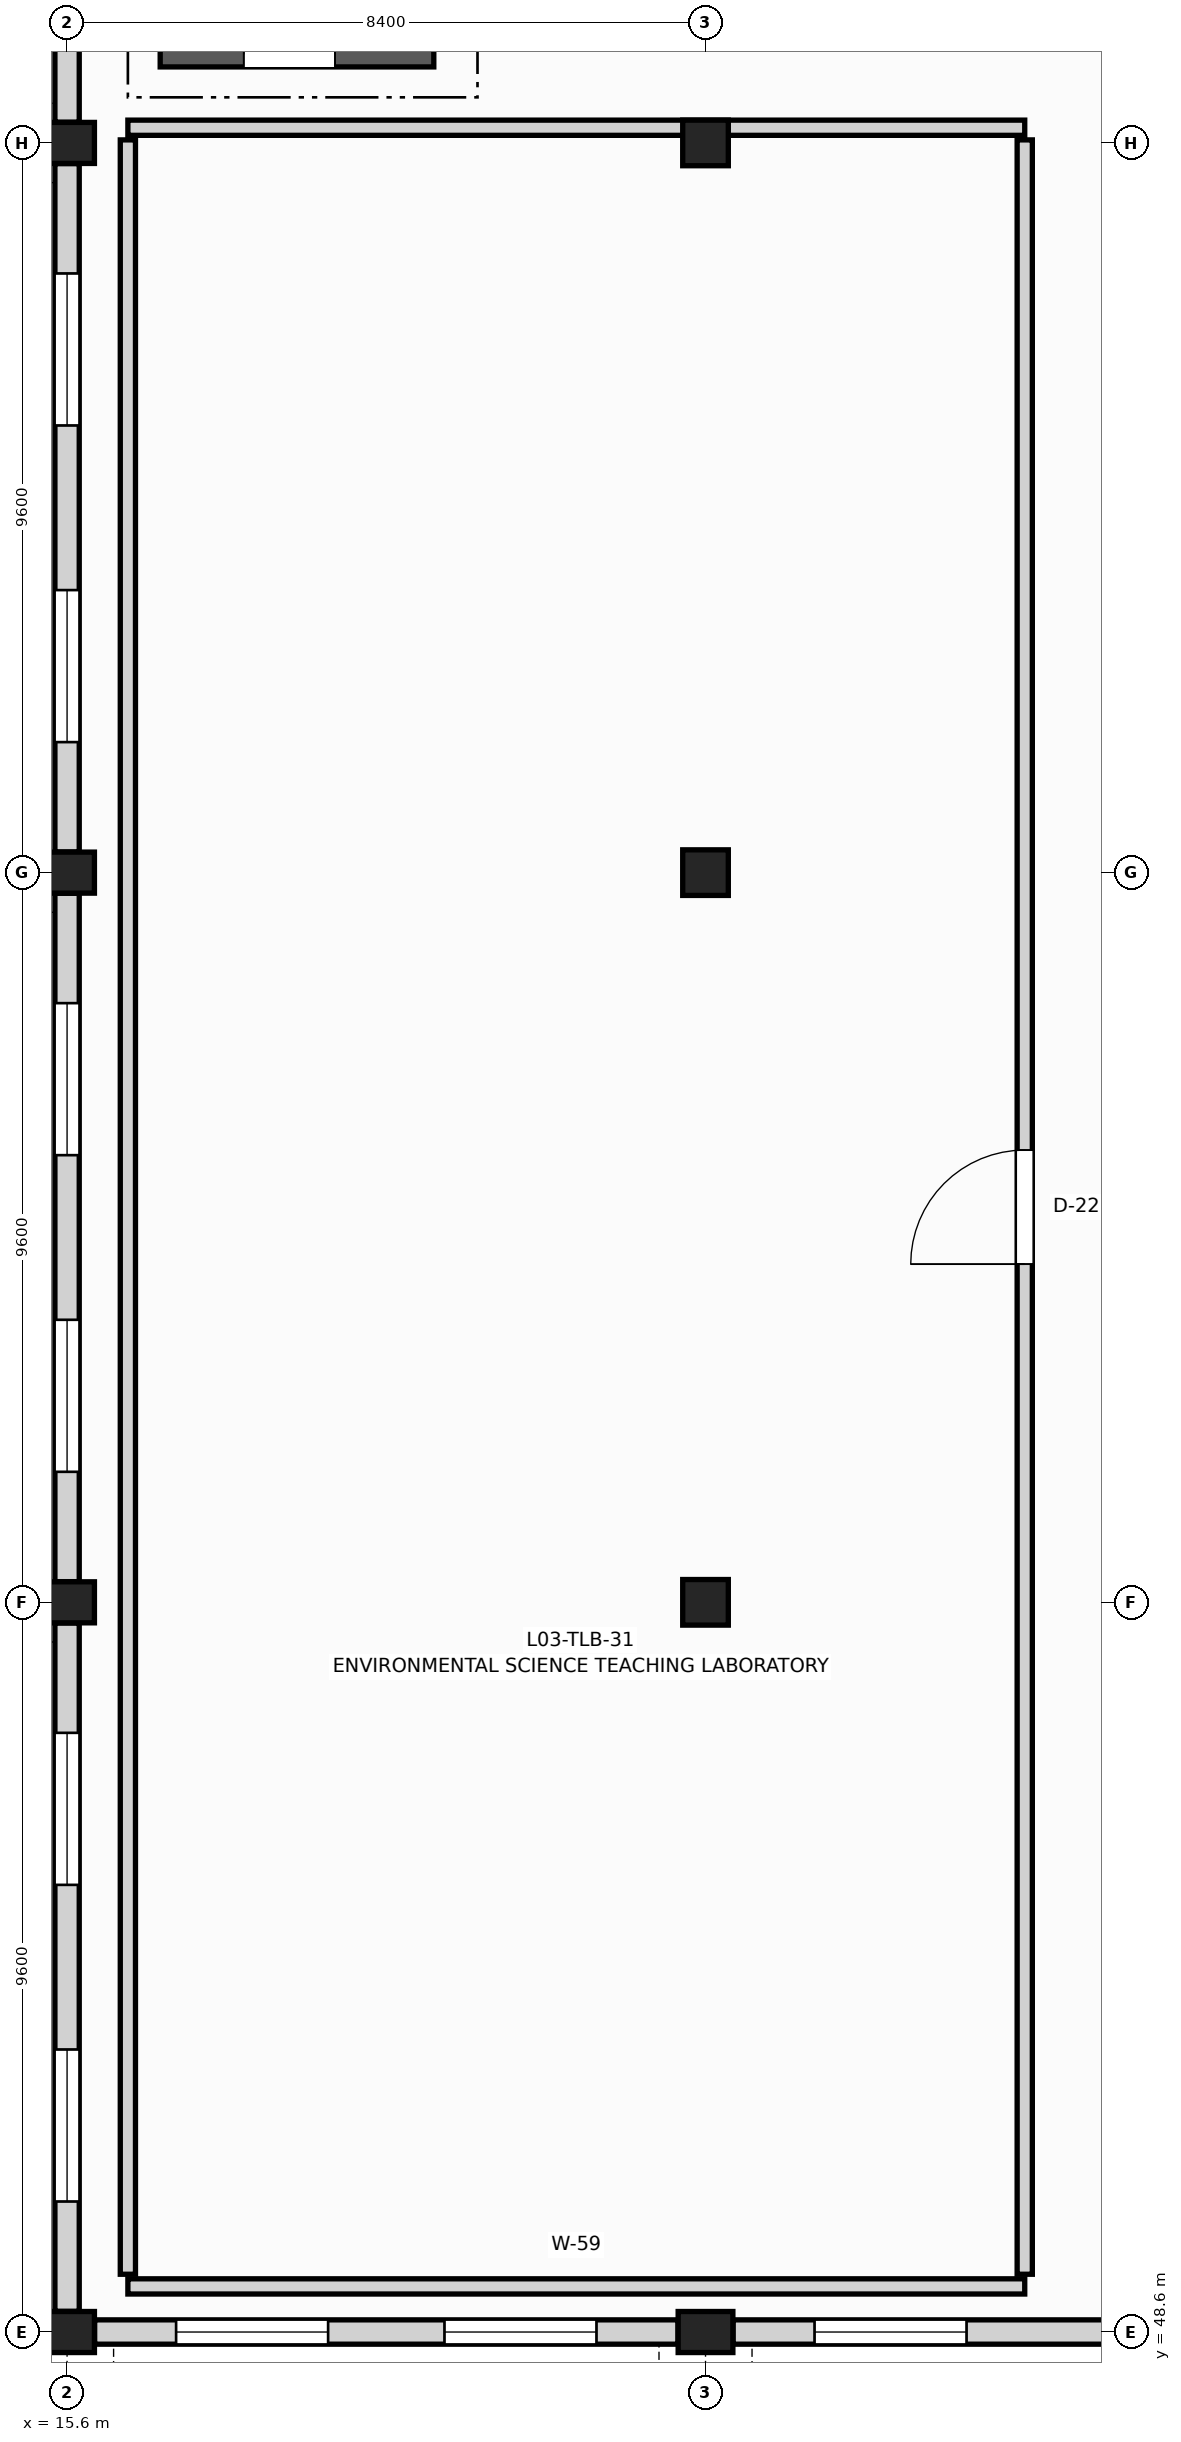
"""IFC4 building model, lengths in metres.
Left out: names, types, materials, properties, quantities, classifications, styles, units other than length and angle.
Written with IfcOpenShell. Run it as: python <this file> out.ifc"""

import sys

from ifc_helpers import new_model, si_unit, direction, frame, frame_2d, origin, origin_2d, place, context, subcontext, project, spatial, rectangle, extrude, element, fill, save


model = new_model("IFC4")
c1 = context("Model", 3, precision=1e-05, world=origin(), true_north=direction((0.0, 1.0)))
c2 = subcontext(c1, "Body", "Model", "MODEL_VIEW")
j1 = project(units=[si_unit("LENGTHUNIT", "METRE"), si_unit("PLANEANGLEUNIT", "RADIAN")], contexts=[c1])
p1 = place(None, origin())
s1 = spatial("IfcSite", under=j1, at=p1, CompositionType="ELEMENT")
p2 = place(p1, origin())
s2 = spatial("IfcBuilding", under=s1, at=p2, CompositionType="ELEMENT")
p3 = place(p2, frame((0.0, 0.0, 14.1)))
s3 = spatial("IfcBuildingStorey", under=s2, at=p3, CompositionType="ELEMENT", Elevation=14.1)
for number, where, z_axis, x_axis in (
    (1, (15.6, 48.6, 0.0), (0.0, 0.0, 1.0), (1.0, 0.0, 0.0)),
    (2, (15.6, 58.2, 0.0), (0.0, 0.0, 1.0), (1.0, 0.0, 0.0)),
    (3, (15.6, 67.8, 0.0), (0.0, 0.0, 1.0), (1.0, 0.0, 0.0)),
    (4, (15.6, 77.4, 0.0), (0.0, 0.0, 1.0), (1.0, 0.0, 0.0)),
    (5, (24.0, 48.6, 0.0), (0.0, 0.0, 1.0), (1.0, 0.0, 0.0)),
):
    element("IfcColumn", number, at=place(p3, frame(where, z_axis=z_axis, x_axis=x_axis)), inside=s3, PredefinedType="COLUMN", context=c2, shape_type="SweptSolid", body=[
        extrude(rectangle(XDim=0.72, YDim=0.54, at=origin_2d()), origin(), (0.0, 0.0, 1.0), 3.9),
    ])
for number, where, z_axis, x_axis in (
    (6, (24.0, 58.2, 0.0), (0.0, 0.0, 1.0), (1.0, 0.0, 0.0)),
    (7, (24.0, 67.8, 0.0), (0.0, 0.0, 1.0), (1.0, 0.0, 0.0)),
    (8, (24.0, 77.4, 0.0), (0.0, 0.0, 1.0), (1.0, 0.0, 0.0)),
):
    element("IfcColumn", number, at=place(p3, frame(where, z_axis=z_axis, x_axis=x_axis)), inside=s3, PredefinedType="COLUMN", context=c2, shape_type="SweptSolid", body=[
        extrude(rectangle(XDim=0.6, YDim=0.6, at=origin_2d()), origin(), (0.0, 0.0, 1.0), 3.9),
    ])
p4 = place(p3, frame((15.962, 48.6, 0.0), z_axis=(0.0, 0.0, 1.0), x_axis=(1.0, 0.0, 0.0)))
e9 = element("IfcWall", 9, at=p4, inside=s3, PredefinedType="SOLIDWALL", context=c2, shape_type="SweptSolid", body=[
    extrude(rectangle(XDim=7.676, YDim=0.32, at=frame_2d((3.838, 0.0))), origin(), (0.0, 0.0, 1.0), 3.08),
])
p5 = place(p4, frame((1.073, 0.0, 0.85)))
e10 = element("IfcOpeningElement", 10, at=p5, cuts=e9, PredefinedType="OPENING", context=c2, shape_type="SweptSolid", body=[
    extrude(rectangle(XDim=2.0, YDim=1.9, at=frame_2d((1.0, 0.95))), frame((0.0, 0.17, 0.0), z_axis=(0.0, -1.0, 0.0), x_axis=(1.0, 0.0, 0.0)), (0.0, 0.0, 1.0), 0.34),
])
p6 = place(p4, frame((4.604, 0.0, 0.85)))
e11 = element("IfcOpeningElement", 11, at=p6, cuts=e9, PredefinedType="OPENING", context=c2, shape_type="SweptSolid", body=[
    extrude(rectangle(XDim=2.0, YDim=1.9, at=frame_2d((1.0, 0.95))), frame((0.0, 0.17, 0.0), z_axis=(0.0, -1.0, 0.0), x_axis=(1.0, 0.0, 0.0)), (0.0, 0.0, 1.0), 0.34),
])
p7 = place(p3, frame((24.362, 48.6, 0.0), z_axis=(0.0, 0.0, 1.0), x_axis=(1.0, 0.0, 0.0)))
e12 = element("IfcWall", 12, at=p7, inside=s3, PredefinedType="SOLIDWALL", context=c2, shape_type="SweptSolid", body=[
    extrude(rectangle(XDim=7.676, YDim=0.32, at=frame_2d((3.838, 0.0))), origin(), (0.0, 0.0, 1.0), 3.08),
])
p8 = place(p7, frame((1.073, 0.0, 0.85)))
e13 = element("IfcOpeningElement", 13, at=p8, cuts=e12, PredefinedType="OPENING", context=c2, shape_type="SweptSolid", body=[
    extrude(rectangle(XDim=2.0, YDim=1.9, at=frame_2d((1.0, 0.95))), frame((0.0, 0.17, 0.0), z_axis=(0.0, -1.0, 0.0), x_axis=(1.0, 0.0, 0.0)), (0.0, 0.0, 1.0), 0.34),
])
p9 = place(p3, frame((15.6, 48.872, 0.0), z_axis=(0.0, 0.0, 1.0), x_axis=(0.0, 1.0, 0.0)))
e14 = element("IfcWall", 14, at=p9, inside=s3, PredefinedType="SOLIDWALL", context=c2, shape_type="SweptSolid", body=[
    extrude(rectangle(XDim=9.056, YDim=0.32, at=frame_2d((4.528, 0.0))), origin(), (0.0, 0.0, 1.0), 3.08),
])
p10 = place(p9, frame((1.445, 0.0, 0.85)))
e15 = element("IfcOpeningElement", 15, at=p10, cuts=e14, PredefinedType="OPENING", context=c2, shape_type="SweptSolid", body=[
    extrude(rectangle(XDim=2.0, YDim=1.9, at=frame_2d((1.0, 0.95))), frame((0.0, 0.17, 0.0), z_axis=(0.0, -1.0, 0.0), x_axis=(1.0, 0.0, 0.0)), (0.0, 0.0, 1.0), 0.34),
])
p11 = place(p9, frame((5.611, 0.0, 0.85)))
e16 = element("IfcOpeningElement", 16, at=p11, cuts=e14, PredefinedType="OPENING", context=c2, shape_type="SweptSolid", body=[
    extrude(rectangle(XDim=2.0, YDim=1.9, at=frame_2d((1.0, 0.95))), frame((0.0, 0.17, 0.0), z_axis=(0.0, -1.0, 0.0), x_axis=(1.0, 0.0, 0.0)), (0.0, 0.0, 1.0), 0.34),
])
p12 = place(p3, frame((15.6, 58.472, 0.0), z_axis=(0.0, 0.0, 1.0), x_axis=(0.0, 1.0, 0.0)))
e17 = element("IfcWall", 17, at=p12, inside=s3, PredefinedType="SOLIDWALL", context=c2, shape_type="SweptSolid", body=[
    extrude(rectangle(XDim=9.056, YDim=0.32, at=frame_2d((4.528, 0.0))), origin(), (0.0, 0.0, 1.0), 3.08),
])
p13 = place(p12, frame((1.445, 0.0, 0.85)))
e18 = element("IfcOpeningElement", 18, at=p13, cuts=e17, PredefinedType="OPENING", context=c2, shape_type="SweptSolid", body=[
    extrude(rectangle(XDim=2.0, YDim=1.9, at=frame_2d((1.0, 0.95))), frame((0.0, 0.17, 0.0), z_axis=(0.0, -1.0, 0.0), x_axis=(1.0, 0.0, 0.0)), (0.0, 0.0, 1.0), 0.34),
])
p14 = place(p12, frame((5.611, 0.0, 0.85)))
e19 = element("IfcOpeningElement", 19, at=p14, cuts=e17, PredefinedType="OPENING", context=c2, shape_type="SweptSolid", body=[
    extrude(rectangle(XDim=2.0, YDim=1.9, at=frame_2d((1.0, 0.95))), frame((0.0, 0.17, 0.0), z_axis=(0.0, -1.0, 0.0), x_axis=(1.0, 0.0, 0.0)), (0.0, 0.0, 1.0), 0.34),
])
p15 = place(p3, frame((15.6, 68.072, 0.0), z_axis=(0.0, 0.0, 1.0), x_axis=(0.0, 1.0, 0.0)))
e20 = element("IfcWall", 20, at=p15, inside=s3, PredefinedType="SOLIDWALL", context=c2, shape_type="SweptSolid", body=[
    extrude(rectangle(XDim=9.056, YDim=0.32, at=frame_2d((4.528, 0.0))), origin(), (0.0, 0.0, 1.0), 3.08),
])
p16 = place(p15, frame((1.445, 0.0, 0.85)))
e21 = element("IfcOpeningElement", 21, at=p16, cuts=e20, PredefinedType="OPENING", context=c2, shape_type="SweptSolid", body=[
    extrude(rectangle(XDim=2.0, YDim=1.9, at=frame_2d((1.0, 0.95))), frame((0.0, 0.17, 0.0), z_axis=(0.0, -1.0, 0.0), x_axis=(1.0, 0.0, 0.0)), (0.0, 0.0, 1.0), 0.34),
])
p17 = place(p15, frame((5.611, 0.0, 0.85)))
e22 = element("IfcOpeningElement", 22, at=p17, cuts=e20, PredefinedType="OPENING", context=c2, shape_type="SweptSolid", body=[
    extrude(rectangle(XDim=2.0, YDim=1.9, at=frame_2d((1.0, 0.95))), frame((0.0, 0.17, 0.0), z_axis=(0.0, -1.0, 0.0), x_axis=(1.0, 0.0, 0.0)), (0.0, 0.0, 1.0), 0.34),
])
p18 = place(p3, frame((15.6, 77.672, 0.0), z_axis=(0.0, 0.0, 1.0), x_axis=(0.0, 1.0, 0.0)))
e23 = element("IfcWall", 23, at=p18, inside=s3, PredefinedType="SOLIDWALL", context=c2, shape_type="SweptSolid", body=[
    extrude(rectangle(XDim=8.976, YDim=0.32, at=frame_2d((4.488, 0.0))), origin(), (0.0, 0.0, 1.0), 3.08),
])
p19 = place(p18, frame((1.424, 0.0, 0.85)))
e24 = element("IfcOpeningElement", 24, at=p19, cuts=e23, PredefinedType="OPENING", context=c2, shape_type="SweptSolid", body=[
    extrude(rectangle(XDim=2.0, YDim=1.9, at=frame_2d((1.0, 0.95))), frame((0.0, 0.17, 0.0), z_axis=(0.0, -1.0, 0.0), x_axis=(1.0, 0.0, 0.0)), (0.0, 0.0, 1.0), 0.34),
])
p20 = place(p18, frame((5.552, 0.0, 0.85)))
e25 = element("IfcOpeningElement", 25, at=p20, cuts=e23, PredefinedType="OPENING", context=c2, shape_type="SweptSolid", body=[
    extrude(rectangle(XDim=2.0, YDim=1.9, at=frame_2d((1.0, 0.95))), frame((0.0, 0.17, 0.0), z_axis=(0.0, -1.0, 0.0), x_axis=(1.0, 0.0, 0.0)), (0.0, 0.0, 1.0), 0.34),
])
p21 = place(p3, frame((16.825, 78.575, 0.0), z_axis=(0.0, 0.0, 1.0), x_axis=(1.0, 0.0, 0.0)))
e26 = element("IfcWall", 26, at=p21, inside=s3, PredefinedType="SHEAR", context=c2, shape_type="SweptSolid", body=[
    extrude(rectangle(XDim=3.6, YDim=0.35, at=frame_2d((1.8, 0.0))), origin(), (0.0, 0.0, 1.0), 3.9),
])
p22 = place(p21, frame((1.1, 0.0, 0.0)))
e27 = element("IfcOpeningElement", 27, at=p22, cuts=e26, PredefinedType="OPENING", context=c2, shape_type="SweptSolid", body=[
    extrude(rectangle(XDim=1.2, YDim=2.2, at=frame_2d((0.6, 1.1))), frame((0.0, 0.185, 0.0), z_axis=(0.0, -1.0, 0.0), x_axis=(1.0, 0.0, 0.0)), (0.0, 0.0, 1.0), 0.37),
])
for number, where, z_axis, x_axis in (
    (28, (16.4, 49.2, 0.0), (0.0, 0.0, 1.0), (1.0, 0.0, 0.0)),
    (29, (16.4, 77.6, 0.0), (0.0, 0.0, 1.0), (1.0, 0.0, 0.0)),
):
    element("IfcWall", number, at=place(p3, frame(where, z_axis=z_axis, x_axis=x_axis)), inside=s3, PredefinedType="PARTITIONING", context=c2, shape_type="SweptSolid", body=[
        extrude(rectangle(XDim=11.8, YDim=0.2, at=frame_2d((5.9, 0.0))), origin(), (0.0, 0.0, 1.0), 3.15),
    ])
p23 = place(p3, frame((16.4, 49.36, 0.0), z_axis=(0.0, 0.0, 1.0), x_axis=(0.0, 1.0, 0.0)))
e30 = element("IfcWall", 30, at=p23, inside=s3, PredefinedType="PARTITIONING", context=c2, shape_type="SweptSolid", body=[
    extrude(rectangle(XDim=28.08, YDim=0.2, at=frame_2d((14.04, 0.0))), origin(), (0.0, 0.0, 1.0), 3.15),
])
p24 = place(p3, frame((28.2, 49.36, 0.0), z_axis=(0.0, 0.0, 1.0), x_axis=(0.0, 1.0, 0.0)))
e31 = element("IfcWall", 31, at=p24, inside=s3, PredefinedType="PARTITIONING", context=c2, shape_type="SweptSolid", body=[
    extrude(rectangle(XDim=28.08, YDim=0.2, at=frame_2d((14.04, 0.0))), origin(), (0.0, 0.0, 1.0), 3.15),
])
p25 = place(p24, frame((13.29, 0.0, 0.0)))
e32 = element("IfcOpeningElement", 32, at=p25, cuts=e31, PredefinedType="OPENING", context=c2, shape_type="SweptSolid", body=[
    extrude(rectangle(XDim=1.5, YDim=2.2, at=frame_2d((0.75, 1.1))), frame((0.0, 0.11, 0.0), z_axis=(0.0, -1.0, 0.0), x_axis=(1.0, 0.0, 0.0)), (0.0, 0.0, 1.0), 0.22),
])
p26 = place(p5, origin())
e33 = element("IfcWindow", 33, at=p26, inside=s3, PartitioningType="SINGLE_PANEL", PredefinedType="WINDOW", context=c2, shape_type="SweptSolid", body=[
    extrude(rectangle(XDim=2.0, YDim=1.9, at=frame_2d((1.0, 0.95))), frame((0.0, 0.03, 0.0), z_axis=(0.0, -1.0, 0.0), x_axis=(1.0, 0.0, 0.0)), (0.0, 0.0, 1.0), 0.06),
])
fill(e10, e33)
p27 = place(p6, origin())
e34 = element("IfcWindow", 34, at=p27, inside=s3, PartitioningType="SINGLE_PANEL", PredefinedType="WINDOW", context=c2, shape_type="SweptSolid", body=[
    extrude(rectangle(XDim=2.0, YDim=1.9, at=frame_2d((1.0, 0.95))), frame((0.0, 0.03, 0.0), z_axis=(0.0, -1.0, 0.0), x_axis=(1.0, 0.0, 0.0)), (0.0, 0.0, 1.0), 0.06),
])
fill(e11, e34)
p28 = place(p8, origin())
e35 = element("IfcWindow", 35, at=p28, inside=s3, PartitioningType="SINGLE_PANEL", PredefinedType="WINDOW", context=c2, shape_type="SweptSolid", body=[
    extrude(rectangle(XDim=2.0, YDim=1.9, at=frame_2d((1.0, 0.95))), frame((0.0, 0.03, 0.0), z_axis=(0.0, -1.0, 0.0), x_axis=(1.0, 0.0, 0.0)), (0.0, 0.0, 1.0), 0.06),
])
fill(e13, e35)
p29 = place(p10, origin())
e36 = element("IfcWindow", 36, at=p29, inside=s3, PartitioningType="SINGLE_PANEL", PredefinedType="WINDOW", context=c2, shape_type="SweptSolid", body=[
    extrude(rectangle(XDim=2.0, YDim=1.9, at=frame_2d((1.0, 0.95))), frame((0.0, 0.03, 0.0), z_axis=(0.0, -1.0, 0.0), x_axis=(1.0, 0.0, 0.0)), (0.0, 0.0, 1.0), 0.06),
])
fill(e15, e36)
p30 = place(p11, origin())
e37 = element("IfcWindow", 37, at=p30, inside=s3, PartitioningType="SINGLE_PANEL", PredefinedType="WINDOW", context=c2, shape_type="SweptSolid", body=[
    extrude(rectangle(XDim=2.0, YDim=1.9, at=frame_2d((1.0, 0.95))), frame((0.0, 0.03, 0.0), z_axis=(0.0, -1.0, 0.0), x_axis=(1.0, 0.0, 0.0)), (0.0, 0.0, 1.0), 0.06),
])
fill(e16, e37)
p31 = place(p13, origin())
e38 = element("IfcWindow", 38, at=p31, inside=s3, PartitioningType="SINGLE_PANEL", PredefinedType="WINDOW", context=c2, shape_type="SweptSolid", body=[
    extrude(rectangle(XDim=2.0, YDim=1.9, at=frame_2d((1.0, 0.95))), frame((0.0, 0.03, 0.0), z_axis=(0.0, -1.0, 0.0), x_axis=(1.0, 0.0, 0.0)), (0.0, 0.0, 1.0), 0.06),
])
fill(e18, e38)
p32 = place(p14, origin())
e39 = element("IfcWindow", 39, at=p32, inside=s3, PartitioningType="SINGLE_PANEL", PredefinedType="WINDOW", context=c2, shape_type="SweptSolid", body=[
    extrude(rectangle(XDim=2.0, YDim=1.9, at=frame_2d((1.0, 0.95))), frame((0.0, 0.03, 0.0), z_axis=(0.0, -1.0, 0.0), x_axis=(1.0, 0.0, 0.0)), (0.0, 0.0, 1.0), 0.06),
])
fill(e19, e39)
p33 = place(p16, origin())
e40 = element("IfcWindow", 40, at=p33, inside=s3, PartitioningType="SINGLE_PANEL", PredefinedType="WINDOW", context=c2, shape_type="SweptSolid", body=[
    extrude(rectangle(XDim=2.0, YDim=1.9, at=frame_2d((1.0, 0.95))), frame((0.0, 0.03, 0.0), z_axis=(0.0, -1.0, 0.0), x_axis=(1.0, 0.0, 0.0)), (0.0, 0.0, 1.0), 0.06),
])
fill(e21, e40)
p34 = place(p17, origin())
e41 = element("IfcWindow", 41, at=p34, inside=s3, PartitioningType="SINGLE_PANEL", PredefinedType="WINDOW", context=c2, shape_type="SweptSolid", body=[
    extrude(rectangle(XDim=2.0, YDim=1.9, at=frame_2d((1.0, 0.95))), frame((0.0, 0.03, 0.0), z_axis=(0.0, -1.0, 0.0), x_axis=(1.0, 0.0, 0.0)), (0.0, 0.0, 1.0), 0.06),
])
fill(e22, e41)
p35 = place(p22, origin())
e42 = element("IfcDoor", 42, at=p35, inside=s3, OperationType="SINGLE_SWING_RIGHT", PredefinedType="DOOR", context=c2, shape_type="SweptSolid", body=[
    extrude(rectangle(XDim=1.2, YDim=2.2, at=frame_2d((0.6, 1.1))), frame((0.0, 0.025, 0.0), z_axis=(0.0, -1.0, 0.0), x_axis=(1.0, 0.0, 0.0)), (0.0, 0.0, 1.0), 0.05),
])
fill(e27, e42)
p36 = place(p25, origin())
e43 = element("IfcDoor", 43, at=p36, inside=s3, OperationType="SINGLE_SWING_LEFT", PredefinedType="DOOR", context=c2, shape_type="SweptSolid", body=[
    extrude(rectangle(XDim=1.5, YDim=2.2, at=frame_2d((0.75, 1.1))), frame((0.0, 0.025, 0.0), z_axis=(0.0, -1.0, 0.0), x_axis=(1.0, 0.0, 0.0)), (0.0, 0.0, 1.0), 0.05),
])
fill(e32, e43)
save(model, sys.argv[1])
